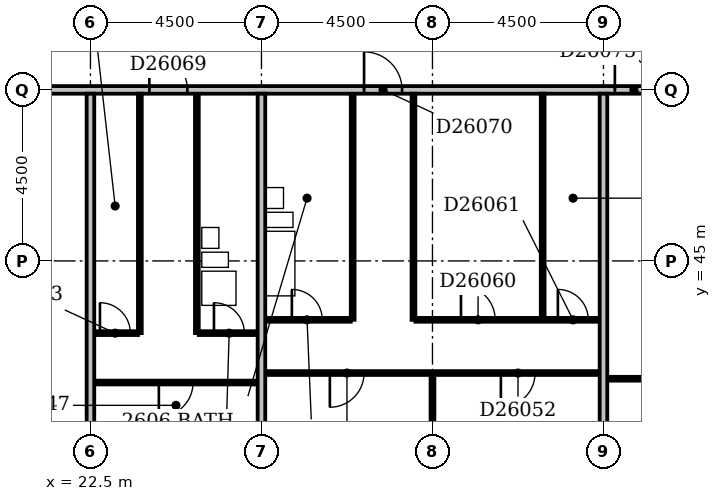
"""IFC4 building model, lengths in metres.
Left out: names, types, materials, properties, quantities, classifications, styles, units other than length and angle.
Written with IfcOpenShell. Run it as: python <this file> out.ifc"""

import sys

from ifc_helpers import new_model, si_unit, direction, frame, frame_2d, origin, place, context, subcontext, project, spatial, rectangle, extrude, element, fill, save


model = new_model("IFC4")
c1 = context("Model", 3, precision=1e-05, world=origin(), true_north=direction((0.0, 1.0)))
c2 = subcontext(c1, "Body", "Model", "MODEL_VIEW")
j1 = project(units=[si_unit("LENGTHUNIT", "METRE"), si_unit("PLANEANGLEUNIT", "RADIAN")], contexts=[c1])
p1 = place(None, origin())
s1 = spatial("IfcSite", under=j1, at=p1, CompositionType="ELEMENT")
p2 = place(p1, origin())
s2 = spatial("IfcBuilding", under=s1, at=p2, CompositionType="ELEMENT")
p3 = place(p2, frame((0.0, 0.0, 104.6)))
s3 = spatial("IfcBuildingStorey", under=s2, at=p3, CompositionType="ELEMENT", Elevation=104.6)
p4 = place(p3, frame((22.5, 36.6, 0.0), z_axis=(0.0, 0.0, 1.0), x_axis=(0.0, 1.0, 0.0)))
e1 = element("IfcWall", 1, at=p4, inside=s3, PredefinedType="PARTITIONING", context=c2, shape_type="SweptSolid", body=[
    extrude(rectangle(XDim=12.8, YDim=0.2, at=frame_2d((6.4, 0.0))), origin(), (0.0, 0.0, 1.0), 3.15),
])
p5 = place(p3, frame((27.0, 36.6, 0.0), z_axis=(0.0, 0.0, 1.0), x_axis=(0.0, 1.0, 0.0)))
e2 = element("IfcWall", 2, at=p5, inside=s3, PredefinedType="PARTITIONING", context=c2, shape_type="SweptSolid", body=[
    extrude(rectangle(XDim=12.8, YDim=0.2, at=frame_2d((6.4, 0.0))), origin(), (0.0, 0.0, 1.0), 2.45),
])
p6 = place(p3, frame((31.5, 36.6, 0.0), z_axis=(0.0, 0.0, 1.0), x_axis=(0.0, 1.0, 0.0)))
e3 = element("IfcWall", 3, at=p6, inside=s3, PredefinedType="PARTITIONING", context=c2, shape_type="SweptSolid", body=[
    extrude(rectangle(XDim=5.4, YDim=0.1, at=frame_2d((2.7, 0.0))), origin(), (0.0, 0.0, 1.0), 3.15),
])
p7 = place(p3, frame((36.0, 36.6, 0.0), z_axis=(0.0, 0.0, 1.0), x_axis=(0.0, 1.0, 0.0)))
e4 = element("IfcWall", 4, at=p7, inside=s3, PredefinedType="PARTITIONING", context=c2, shape_type="SweptSolid", body=[
    extrude(rectangle(XDim=12.8, YDim=0.2, at=frame_2d((6.4, 0.0))), origin(), (0.0, 0.0, 1.0), 2.25),
])
p8 = place(p3, frame((22.6, 41.8, 0.0), z_axis=(0.0, 0.0, 1.0), x_axis=(1.0, 0.0, 0.0)))
e5 = element("IfcWall", 5, at=p8, inside=s3, PredefinedType="PARTITIONING", context=c2, shape_type="SweptSolid", body=[
    extrude(rectangle(XDim=4.3, YDim=0.1, at=frame_2d((2.15, 0.0))), origin(), (0.0, 0.0, 1.0), 3.15),
])
p9 = place(p8, frame((1.7, 0.0, 0.0)))
e6 = element("IfcOpeningElement", 6, at=p9, cuts=e5, PredefinedType="OPENING", context=c2, shape_type="SweptSolid", body=[
    extrude(rectangle(XDim=0.9, YDim=2.1, at=frame_2d((0.45, 1.05))), frame((0.0, 0.062, 0.0), z_axis=(0.0, -1.0, 0.0), x_axis=(1.0, 0.0, 0.0)), (0.0, 0.0, 1.0), 0.124),
])
p10 = place(p3, frame((36.1, 41.9, 0.0), z_axis=(0.0, 0.0, 1.0), x_axis=(1.0, 0.0, 0.0)))
e7 = element("IfcWall", 7, at=p10, inside=s3, PredefinedType="PARTITIONING", context=c2, shape_type="SweptSolid", body=[
    extrude(rectangle(XDim=13.3, YDim=0.1, at=frame_2d((6.65, 0.0))), origin(), (0.0, 0.0, 1.0), 3.15),
])
p11 = place(p10, frame((1.7, 0.0, 0.0)))
e8 = element("IfcOpeningElement", 8, at=p11, cuts=e7, PredefinedType="OPENING", context=c2, shape_type="SweptSolid", body=[
    extrude(rectangle(XDim=0.9, YDim=2.1, at=frame_2d((0.45, 1.05))), frame((0.0, 0.062, 0.0), z_axis=(0.0, -1.0, 0.0), x_axis=(1.0, 0.0, 0.0)), (0.0, 0.0, 1.0), 0.124),
])
p12 = place(p10, frame((7.35, 0.0, 0.0)))
e9 = element("IfcOpeningElement", 9, at=p12, cuts=e7, PredefinedType="OPENING", context=c2, shape_type="SweptSolid", body=[
    extrude(rectangle(XDim=0.9, YDim=2.1, at=frame_2d((0.45, 1.05))), frame((0.0, 0.062, 0.0), z_axis=(0.0, -1.0, 0.0), x_axis=(1.0, 0.0, 0.0)), (0.0, 0.0, 1.0), 0.124),
])
p13 = place(p10, frame((10.7, 0.0, 0.0)))
e10 = element("IfcOpeningElement", 10, at=p13, cuts=e7, PredefinedType="OPENING", context=c2, shape_type="SweptSolid", body=[
    extrude(rectangle(XDim=0.9, YDim=2.1, at=frame_2d((0.45, 1.05))), frame((0.0, 0.062, 0.0), z_axis=(0.0, -1.0, 0.0), x_axis=(1.0, 0.0, 0.0)), (0.0, 0.0, 1.0), 0.124),
])
p14 = place(p3, frame((27.1, 42.05, 0.0), z_axis=(0.0, 0.0, 1.0), x_axis=(1.0, 0.0, 0.0)))
e11 = element("IfcWall", 11, at=p14, inside=s3, PredefinedType="PARTITIONING", context=c2, shape_type="SweptSolid", body=[
    extrude(rectangle(XDim=8.8, YDim=0.1, at=frame_2d((4.4, 0.0))), origin(), (0.0, 0.0, 1.0), 3.15),
])
p15 = place(p14, frame((1.7, 0.0, 0.0)))
e12 = element("IfcOpeningElement", 12, at=p15, cuts=e11, PredefinedType="OPENING", context=c2, shape_type="SweptSolid", body=[
    extrude(rectangle(XDim=0.9, YDim=2.1, at=frame_2d((0.45, 1.05))), frame((0.0, 0.062, 0.0), z_axis=(0.0, -1.0, 0.0), x_axis=(1.0, 0.0, 0.0)), (0.0, 0.0, 1.0), 0.124),
])
p16 = place(p14, frame((6.2, 0.0, 0.0)))
e13 = element("IfcOpeningElement", 13, at=p16, cuts=e11, PredefinedType="OPENING", context=c2, shape_type="SweptSolid", body=[
    extrude(rectangle(XDim=0.9, YDim=2.1, at=frame_2d((0.45, 1.05))), frame((0.0, 0.062, 0.0), z_axis=(0.0, -1.0, 0.0), x_axis=(1.0, 0.0, 0.0)), (0.0, 0.0, 1.0), 0.124),
])
p17 = place(p3, frame((22.6, 43.1, 0.0), z_axis=(0.0, 0.0, 1.0), x_axis=(1.0, 0.0, 0.0)))
e14 = element("IfcWall", 14, at=p17, inside=s3, PredefinedType="PARTITIONING", context=c2, shape_type="SweptSolid", body=[
    extrude(rectangle(XDim=1.15, YDim=0.1, at=frame_2d((0.575, 0.0))), origin(), (0.0, 0.0, 1.0), 3.15),
])
p18 = place(p17, frame((0.15, 0.0, 0.0)))
e15 = element("IfcOpeningElement", 15, at=p18, cuts=e14, PredefinedType="OPENING", context=c2, shape_type="SweptSolid", body=[
    extrude(rectangle(XDim=0.8, YDim=2.1, at=frame_2d((0.4, 1.05))), frame((0.0, 0.062, 0.0), z_axis=(0.0, -1.0, 0.0), x_axis=(1.0, 0.0, 0.0)), (0.0, 0.0, 1.0), 0.124),
])
p19 = place(p3, frame((23.8, 43.1, 0.0), z_axis=(0.0, 0.0, 1.0), x_axis=(0.0, 1.0, 0.0)))
e16 = element("IfcWall", 16, at=p19, inside=s3, PredefinedType="PARTITIONING", context=c2, shape_type="SweptSolid", body=[
    extrude(rectangle(XDim=6.3, YDim=0.1, at=frame_2d((3.15, 0.0))), origin(), (0.0, 0.0, 1.0), 3.15),
])
p20 = place(p3, frame((25.3, 43.1, 0.0), z_axis=(0.0, 0.0, 1.0), x_axis=(0.0, 1.0, 0.0)))
e17 = element("IfcWall", 17, at=p20, inside=s3, PredefinedType="PLUMBINGWALL", context=c2, shape_type="SweptSolid", body=[
    extrude(rectangle(XDim=6.3, YDim=0.1, at=frame_2d((3.15, 0.0))), origin(), (0.0, 0.0, 1.0), 3.15),
])
p21 = place(p3, frame((25.35, 43.1, 0.0), z_axis=(0.0, 0.0, 1.0), x_axis=(1.0, 0.0, 0.0)))
e18 = element("IfcWall", 18, at=p21, inside=s3, PredefinedType="PARTITIONING", context=c2, shape_type="SweptSolid", body=[
    extrude(rectangle(XDim=1.55, YDim=0.1, at=frame_2d((0.775, 0.0))), origin(), (0.0, 0.0, 1.0), 3.15),
])
p22 = place(p21, frame((0.4, 0.0, 0.0)))
e19 = element("IfcOpeningElement", 19, at=p22, cuts=e18, PredefinedType="OPENING", context=c2, shape_type="SweptSolid", body=[
    extrude(rectangle(XDim=0.8, YDim=2.1, at=frame_2d((0.4, 1.05))), frame((0.0, 0.062, 0.0), z_axis=(0.0, -1.0, 0.0), x_axis=(1.0, 0.0, 0.0)), (0.0, 0.0, 1.0), 0.124),
])
p23 = place(p3, frame((27.1, 43.45, 0.0), z_axis=(0.0, 0.0, 1.0), x_axis=(1.0, 0.0, 0.0)))
e20 = element("IfcWall", 20, at=p23, inside=s3, PredefinedType="PARTITIONING", context=c2, shape_type="SweptSolid", body=[
    extrude(rectangle(XDim=2.25, YDim=0.1, at=frame_2d((1.125, 0.0))), origin(), (0.0, 0.0, 1.0), 3.15),
])
p24 = place(p23, frame((0.7, 0.0, 0.0)))
e21 = element("IfcOpeningElement", 21, at=p24, cuts=e20, PredefinedType="OPENING", context=c2, shape_type="SweptSolid", body=[
    extrude(rectangle(XDim=0.8, YDim=2.1, at=frame_2d((0.4, 1.05))), frame((0.0, 0.062, 0.0), z_axis=(0.0, -1.0, 0.0), x_axis=(1.0, 0.0, 0.0)), (0.0, 0.0, 1.0), 0.124),
])
p25 = place(p3, frame((29.4, 43.45, 0.0), z_axis=(0.0, 0.0, 1.0), x_axis=(0.0, 1.0, 0.0)))
e22 = element("IfcWall", 22, at=p25, inside=s3, PredefinedType="PLUMBINGWALL", context=c2, shape_type="SweptSolid", body=[
    extrude(rectangle(XDim=5.95, YDim=0.1, at=frame_2d((2.975, 0.0))), origin(), (0.0, 0.0, 1.0), 3.15),
])
p26 = place(p3, frame((31.0, 43.45, 0.0), z_axis=(0.0, 0.0, 1.0), x_axis=(0.0, 1.0, 0.0)))
e23 = element("IfcWall", 23, at=p26, inside=s3, PredefinedType="PARTITIONING", context=c2, shape_type="SweptSolid", body=[
    extrude(rectangle(XDim=5.95, YDim=0.1, at=frame_2d((2.975, 0.0))), origin(), (0.0, 0.0, 1.0), 3.15),
])
p27 = place(p3, frame((31.05, 43.45, 0.0), z_axis=(0.0, 0.0, 1.0), x_axis=(1.0, 0.0, 0.0)))
e24 = element("IfcWall", 24, at=p27, inside=s3, PredefinedType="PARTITIONING", context=c2, shape_type="SweptSolid", body=[
    extrude(rectangle(XDim=4.85, YDim=0.1, at=frame_2d((2.425, 0.0))), origin(), (0.0, 0.0, 1.0), 3.15),
])
p28 = place(p27, frame((1.2, 0.0, 0.0)))
e25 = element("IfcOpeningElement", 25, at=p28, cuts=e24, PredefinedType="OPENING", context=c2, shape_type="SweptSolid", body=[
    extrude(rectangle(XDim=0.9, YDim=2.1, at=frame_2d((0.45, 1.05))), frame((0.0, 0.062, 0.0), z_axis=(0.0, -1.0, 0.0), x_axis=(1.0, 0.0, 0.0)), (0.0, 0.0, 1.0), 0.124),
])
p29 = place(p27, frame((3.75, 0.0, 0.0)))
e26 = element("IfcOpeningElement", 26, at=p29, cuts=e24, PredefinedType="OPENING", context=c2, shape_type="SweptSolid", body=[
    extrude(rectangle(XDim=0.8, YDim=2.1, at=frame_2d((0.4, 1.05))), frame((0.0, 0.062, 0.0), z_axis=(0.0, -1.0, 0.0), x_axis=(1.0, 0.0, 0.0)), (0.0, 0.0, 1.0), 0.124),
])
p30 = place(p3, frame((34.4, 43.5, 0.0), z_axis=(0.0, 0.0, 1.0), x_axis=(0.0, 1.0, 0.0)))
e27 = element("IfcWall", 27, at=p30, inside=s3, PredefinedType="PARTITIONING", context=c2, shape_type="SweptSolid", body=[
    extrude(rectangle(XDim=5.9, YDim=0.1, at=frame_2d((2.95, 0.0))), origin(), (0.0, 0.0, 1.0), 3.15),
])
p31 = place(p3, frame((9.1, 49.5, 0.0), z_axis=(0.0, 0.0, 1.0), x_axis=(1.0, 0.0, 0.0)))
e28 = element("IfcWall", 28, at=p31, inside=s3, PredefinedType="PARTITIONING", context=c2, shape_type="SweptSolid", body=[
    extrude(rectangle(XDim=57.8, YDim=0.2, at=frame_2d((28.9, 0.0))), origin(), (0.0, 0.0, 1.0), 3.15),
])
p32 = place(p31, frame((14.95, 0.0, 0.0)))
e29 = element("IfcOpeningElement", 29, at=p32, cuts=e28, PredefinedType="OPENING", context=c2, shape_type="SweptSolid", body=[
    extrude(rectangle(XDim=1.0, YDim=2.1, at=frame_2d((0.5, 1.05))), frame((0.0, 0.112, 0.0), z_axis=(0.0, -1.0, 0.0), x_axis=(1.0, 0.0, 0.0)), (0.0, 0.0, 1.0), 0.224),
])
p33 = place(p31, frame((20.6, 0.0, 0.0)))
e30 = element("IfcOpeningElement", 30, at=p33, cuts=e28, PredefinedType="OPENING", context=c2, shape_type="SweptSolid", body=[
    extrude(rectangle(XDim=1.0, YDim=2.1, at=frame_2d((0.5, 1.05))), frame((0.0, 0.112, 0.0), z_axis=(0.0, -1.0, 0.0), x_axis=(1.0, 0.0, 0.0)), (0.0, 0.0, 1.0), 0.224),
])
p34 = place(p31, frame((27.2, 0.0, 0.0)))
e31 = element("IfcOpeningElement", 31, at=p34, cuts=e28, PredefinedType="OPENING", context=c2, shape_type="SweptSolid", body=[
    extrude(rectangle(XDim=1.0, YDim=2.1, at=frame_2d((0.5, 1.05))), frame((0.0, 0.112, 0.0), z_axis=(0.0, -1.0, 0.0), x_axis=(1.0, 0.0, 0.0)), (0.0, 0.0, 1.0), 0.224),
])
p35 = place(p31, frame((40.7, 0.0, 0.0)))
e32 = element("IfcOpeningElement", 32, at=p35, cuts=e28, PredefinedType="OPENING", context=c2, shape_type="SweptSolid", body=[
    extrude(rectangle(XDim=1.0, YDim=2.1, at=frame_2d((0.5, 1.05))), frame((0.0, 0.112, 0.0), z_axis=(0.0, -1.0, 0.0), x_axis=(1.0, 0.0, 0.0)), (0.0, 0.0, 1.0), 0.224),
])
p36 = place(p31, frame((10.65, 0.0, 0.0)))
e33 = element("IfcOpeningElement", 33, at=p36, cuts=e28, PredefinedType="OPENING", context=c2, shape_type="SweptSolid", body=[
    extrude(rectangle(XDim=0.9, YDim=2.1, at=frame_2d((0.45, 1.05))), frame((0.0, 0.112, 0.0), z_axis=(0.0, -1.0, 0.0), x_axis=(1.0, 0.0, 0.0)), (0.0, 0.0, 1.0), 0.224),
])
p37 = place(p9, frame((0.9, 0.0, 0.0), z_axis=(0.0, 0.0, 1.0), x_axis=(-1.0, 0.0, 0.0)))
e34 = element("IfcDoor", 34, at=p37, inside=s3, OperationType="SINGLE_SWING_RIGHT", PredefinedType="DOOR", context=c2, shape_type="SweptSolid", body=[
    extrude(rectangle(XDim=0.9, YDim=2.1, at=frame_2d((0.45, 1.05))), frame((0.0, 0.025, 0.0), z_axis=(0.0, -1.0, 0.0), x_axis=(1.0, 0.0, 0.0)), (0.0, 0.0, 1.0), 0.05),
])
fill(e6, e34)
p38 = place(p15, frame((0.9, 0.0, 0.0), z_axis=(0.0, 0.0, 1.0), x_axis=(-1.0, 0.0, 0.0)))
e35 = element("IfcDoor", 35, at=p38, inside=s3, OperationType="SINGLE_SWING_RIGHT", PredefinedType="DOOR", context=c2, shape_type="SweptSolid", body=[
    extrude(rectangle(XDim=0.9, YDim=2.1, at=frame_2d((0.45, 1.05))), frame((0.0, 0.025, 0.0), z_axis=(0.0, -1.0, 0.0), x_axis=(1.0, 0.0, 0.0)), (0.0, 0.0, 1.0), 0.05),
])
fill(e12, e35)
p39 = place(p16, frame((0.9, 0.0, 0.0), z_axis=(0.0, 0.0, 1.0), x_axis=(-1.0, 0.0, 0.0)))
e36 = element("IfcDoor", 36, at=p39, inside=s3, OperationType="SINGLE_SWING_RIGHT", PredefinedType="DOOR", context=c2, shape_type="SweptSolid", body=[
    extrude(rectangle(XDim=0.9, YDim=2.1, at=frame_2d((0.45, 1.05))), frame((0.0, 0.025, 0.0), z_axis=(0.0, -1.0, 0.0), x_axis=(1.0, 0.0, 0.0)), (0.0, 0.0, 1.0), 0.05),
])
fill(e13, e36)
p40 = place(p18, origin())
e37 = element("IfcDoor", 37, at=p40, inside=s3, OperationType="SINGLE_SWING_LEFT", PredefinedType="DOOR", context=c2, shape_type="SweptSolid", body=[
    extrude(rectangle(XDim=0.8, YDim=2.1, at=frame_2d((0.4, 1.05))), frame((0.0, 0.025, 0.0), z_axis=(0.0, -1.0, 0.0), x_axis=(1.0, 0.0, 0.0)), (0.0, 0.0, 1.0), 0.05),
])
fill(e15, e37)
p41 = place(p22, origin())
e38 = element("IfcDoor", 38, at=p41, inside=s3, OperationType="SINGLE_SWING_LEFT", PredefinedType="DOOR", context=c2, shape_type="SweptSolid", body=[
    extrude(rectangle(XDim=0.8, YDim=2.1, at=frame_2d((0.4, 1.05))), frame((0.0, 0.025, 0.0), z_axis=(0.0, -1.0, 0.0), x_axis=(1.0, 0.0, 0.0)), (0.0, 0.0, 1.0), 0.05),
])
fill(e19, e38)
p42 = place(p24, origin())
e39 = element("IfcDoor", 39, at=p42, inside=s3, OperationType="SINGLE_SWING_LEFT", PredefinedType="DOOR", context=c2, shape_type="SweptSolid", body=[
    extrude(rectangle(XDim=0.8, YDim=2.1, at=frame_2d((0.4, 1.05))), frame((0.0, 0.025, 0.0), z_axis=(0.0, -1.0, 0.0), x_axis=(1.0, 0.0, 0.0)), (0.0, 0.0, 1.0), 0.05),
])
fill(e21, e39)
p43 = place(p28, origin())
e40 = element("IfcDoor", 40, at=p43, inside=s3, OperationType="SINGLE_SWING_LEFT", PredefinedType="DOOR", context=c2, shape_type="SweptSolid", body=[
    extrude(rectangle(XDim=0.9, YDim=2.1, at=frame_2d((0.45, 1.05))), frame((0.0, 0.025, 0.0), z_axis=(0.0, -1.0, 0.0), x_axis=(1.0, 0.0, 0.0)), (0.0, 0.0, 1.0), 0.05),
])
fill(e25, e40)
p44 = place(p29, origin())
e41 = element("IfcDoor", 41, at=p44, inside=s3, OperationType="SINGLE_SWING_LEFT", PredefinedType="DOOR", context=c2, shape_type="SweptSolid", body=[
    extrude(rectangle(XDim=0.8, YDim=2.1, at=frame_2d((0.4, 1.05))), frame((0.0, 0.025, 0.0), z_axis=(0.0, -1.0, 0.0), x_axis=(1.0, 0.0, 0.0)), (0.0, 0.0, 1.0), 0.05),
])
fill(e26, e41)
p45 = place(p32, origin())
e42 = element("IfcDoor", 42, at=p45, inside=s3, OperationType="SINGLE_SWING_LEFT", PredefinedType="DOOR", context=c2, shape_type="SweptSolid", body=[
    extrude(rectangle(XDim=1.0, YDim=2.1, at=frame_2d((0.5, 1.05))), frame((0.0, 0.025, 0.0), z_axis=(0.0, -1.0, 0.0), x_axis=(1.0, 0.0, 0.0)), (0.0, 0.0, 1.0), 0.05),
])
fill(e29, e42)
p46 = place(p33, origin())
e43 = element("IfcDoor", 43, at=p46, inside=s3, OperationType="SINGLE_SWING_LEFT", PredefinedType="DOOR", context=c2, shape_type="SweptSolid", body=[
    extrude(rectangle(XDim=1.0, YDim=2.1, at=frame_2d((0.5, 1.05))), frame((0.0, 0.025, 0.0), z_axis=(0.0, -1.0, 0.0), x_axis=(1.0, 0.0, 0.0)), (0.0, 0.0, 1.0), 0.05),
])
fill(e30, e43)
p47 = place(p34, origin())
e44 = element("IfcDoor", 44, at=p47, inside=s3, OperationType="SINGLE_SWING_LEFT", PredefinedType="DOOR", context=c2, shape_type="SweptSolid", body=[
    extrude(rectangle(XDim=1.0, YDim=2.1, at=frame_2d((0.5, 1.05))), frame((0.0, 0.025, 0.0), z_axis=(0.0, -1.0, 0.0), x_axis=(1.0, 0.0, 0.0)), (0.0, 0.0, 1.0), 0.05),
])
fill(e31, e44)
save(model, sys.argv[1])
